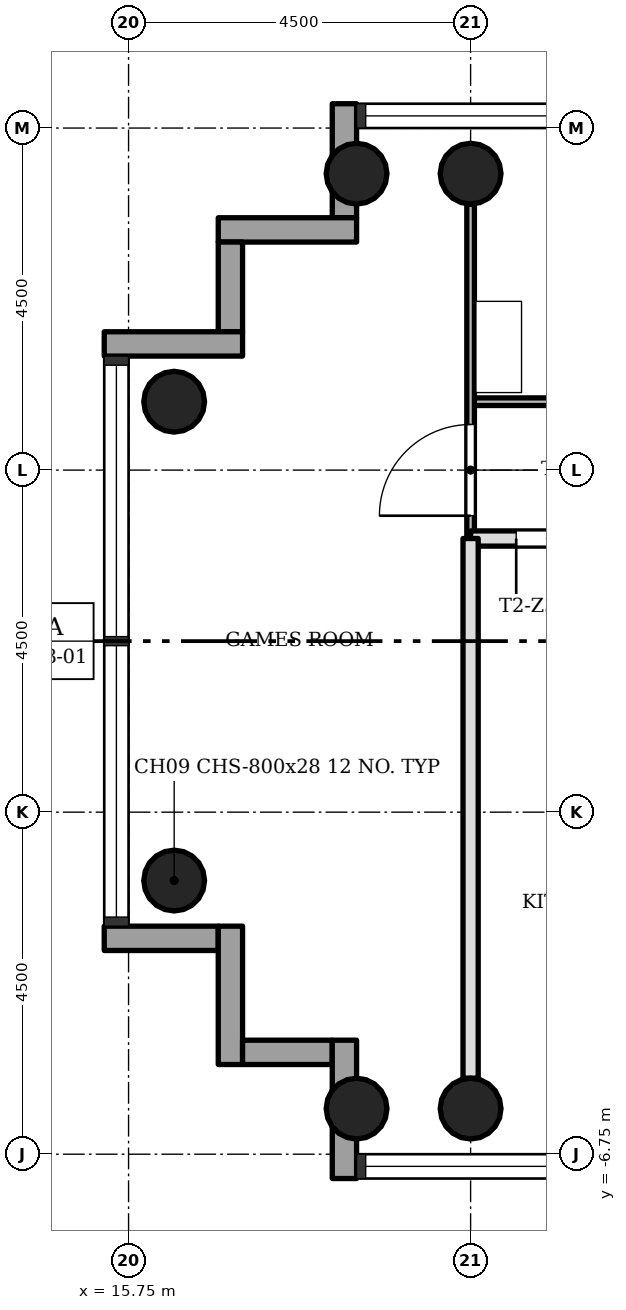
"""IFC4 building model, lengths in metres.
Left out: names, types, materials, properties, quantities, classifications, styles, units other than length and angle.
Written with IfcOpenShell. Run it as: python <this file> out.ifc"""

import sys

from ifc_helpers import new_model, si_unit, direction, frame, frame_2d, origin, origin_2d, place, context, subcontext, project, spatial, rectangle, hollow_circle, extrude, element, fill, save


model = new_model("IFC4")
c1 = context("Model", 3, precision=1e-05, world=origin(), true_north=direction((0.0, 1.0)))
c2 = subcontext(c1, "Body", "Model", "MODEL_VIEW")
j1 = project(units=[si_unit("LENGTHUNIT", "METRE"), si_unit("PLANEANGLEUNIT", "RADIAN")], contexts=[c1])
p1 = place(None, origin())
s1 = spatial("IfcSite", under=j1, at=p1, CompositionType="ELEMENT")
p2 = place(p1, origin())
s2 = spatial("IfcBuilding", under=s1, at=p2, CompositionType="ELEMENT")
p3 = place(p2, frame((0.0, 0.0, 133.7)))
s3 = spatial("IfcBuildingStorey", under=s2, at=p3, CompositionType="ELEMENT", Elevation=133.7)
for number, where, z_axis, x_axis in (
    (1, (20.25, 6.15, 0.0), (0.0, 0.0, 1.0), (1.0, 0.0, 0.0)),
    (2, (20.25, -6.15, 0.0), (0.0, 0.0, 1.0), (1.0, 0.0, 0.0)),
    (3, (18.75, 6.15, 0.0), (0.0, 0.0, 1.0), (1.0, 0.0, 0.0)),
    (4, (18.75, -6.15, 0.0), (0.0, 0.0, 1.0), (1.0, 0.0, 0.0)),
    (5, (16.35, 3.15, 0.0), (0.0, 0.0, 1.0), (1.0, 0.0, 0.0)),
    (6, (16.35, -3.15, 0.0), (0.0, 0.0, 1.0), (1.0, 0.0, 0.0)),
):
    element("IfcColumn", number, at=place(p3, frame(where, z_axis=z_axis, x_axis=x_axis)), inside=s3, PredefinedType="COLUMN", context=c2, shape_type="SweptSolid", body=[
        extrude(hollow_circle(Radius=0.4, WallThickness=0.028, at=origin_2d()), origin(), (0.0, 0.0, 1.0), 3.4),
    ])
p4 = place(p3, frame((18.59, 7.07, -0.3), z_axis=(0.0, 0.0, 1.0), x_axis=(0.0, -1.0, 0.0)))
e7 = element("IfcWall", 7, at=p4, inside=s3, PredefinedType="STANDARD", context=c2, shape_type="SweptSolid", body=[
    extrude(rectangle(XDim=1.5, YDim=0.32, at=frame_2d((0.75, 0.0))), origin(), (0.0, 0.0, 1.0), 3.4),
])
p5 = place(p3, frame((18.75, 5.41, -0.3), z_axis=(0.0, 0.0, 1.0), x_axis=(-1.0, 0.0, 0.0)))
e8 = element("IfcWall", 8, at=p5, inside=s3, PredefinedType="STANDARD", context=c2, shape_type="SweptSolid", body=[
    extrude(rectangle(XDim=1.82, YDim=0.32, at=frame_2d((0.91, 0.0))), origin(), (0.0, 0.0, 1.0), 3.4),
])
p6 = place(p3, frame((17.09, 5.25, -0.3), z_axis=(0.0, 0.0, 1.0), x_axis=(0.0, -1.0, 0.0)))
e9 = element("IfcWall", 9, at=p6, inside=s3, PredefinedType="STANDARD", context=c2, shape_type="SweptSolid", body=[
    extrude(rectangle(XDim=1.18, YDim=0.32, at=frame_2d((0.59, 0.0))), origin(), (0.0, 0.0, 1.0), 3.4),
])
p7 = place(p3, frame((17.25, 3.91, -0.3), z_axis=(0.0, 0.0, 1.0), x_axis=(-1.0, 0.0, 0.0)))
e10 = element("IfcWall", 10, at=p7, inside=s3, PredefinedType="STANDARD", context=c2, shape_type="SweptSolid", body=[
    extrude(rectangle(XDim=1.82, YDim=0.32, at=frame_2d((0.91, 0.0))), origin(), (0.0, 0.0, 1.0), 3.4),
])
p8 = place(p3, frame((15.43, -3.91, -0.3), z_axis=(0.0, 0.0, 1.0), x_axis=(1.0, 0.0, 0.0)))
e11 = element("IfcWall", 11, at=p8, inside=s3, PredefinedType="STANDARD", context=c2, shape_type="SweptSolid", body=[
    extrude(rectangle(XDim=1.5, YDim=0.32, at=frame_2d((0.75, 0.0))), origin(), (0.0, 0.0, 1.0), 3.4),
])
p9 = place(p3, frame((17.09, -3.75, -0.3), z_axis=(0.0, 0.0, 1.0), x_axis=(0.0, -1.0, 0.0)))
e12 = element("IfcWall", 12, at=p9, inside=s3, PredefinedType="STANDARD", context=c2, shape_type="SweptSolid", body=[
    extrude(rectangle(XDim=1.82, YDim=0.32, at=frame_2d((0.91, 0.0))), origin(), (0.0, 0.0, 1.0), 3.4),
])
p10 = place(p3, frame((17.25, -5.41, -0.3), z_axis=(0.0, 0.0, 1.0), x_axis=(1.0, 0.0, 0.0)))
e13 = element("IfcWall", 13, at=p10, inside=s3, PredefinedType="STANDARD", context=c2, shape_type="SweptSolid", body=[
    extrude(rectangle(XDim=1.18, YDim=0.32, at=frame_2d((0.59, 0.0))), origin(), (0.0, 0.0, 1.0), 3.4),
])
p11 = place(p3, frame((18.59, -5.25, -0.3), z_axis=(0.0, 0.0, 1.0), x_axis=(0.0, -1.0, 0.0)))
e14 = element("IfcWall", 14, at=p11, inside=s3, PredefinedType="STANDARD", context=c2, shape_type="SweptSolid", body=[
    extrude(rectangle(XDim=1.82, YDim=0.32, at=frame_2d((0.91, 0.0))), origin(), (0.0, 0.0, 1.0), 3.4),
])
p12 = place(p3, frame((24.75, 1.35, 0.0), z_axis=(0.0, 0.0, 1.0), x_axis=(-1.0, 0.0, 0.0)))
e15 = element("IfcWall", 15, at=p12, inside=s3, PredefinedType="SOLIDWALL", context=c2, shape_type="SweptSolid", body=[
    extrude(rectangle(XDim=4.5, YDim=0.2, at=frame_2d((2.25, 0.0))), origin(), (0.0, 0.0, 1.0), 3.0),
])
p13 = place(p12, frame((3.0, 0.0, 0.0)))
e16 = element("IfcOpeningElement", 16, at=p13, cuts=e15, PredefinedType="OPENING", context=c2, shape_type="SweptSolid", body=[
    extrude(rectangle(XDim=0.9, YDim=2.1, at=frame_2d((0.45, 1.05))), frame((0.0, 0.11, 0.0), z_axis=(0.0, -1.0, 0.0), x_axis=(1.0, 0.0, 0.0)), (0.0, 0.0, 1.0), 0.22),
])
p14 = place(p3, frame((29.25, 3.15, 0.0), z_axis=(0.0, 0.0, 1.0), x_axis=(-1.0, 0.0, 0.0)))
e17 = element("IfcWall", 17, at=p14, inside=s3, PredefinedType="PARTITIONING", context=c2, shape_type="SweptSolid", body=[
    extrude(rectangle(XDim=9.0, YDim=0.1, at=frame_2d((4.5, 0.0))), origin(), (0.0, 0.0, 1.0), 3.0),
])
p15 = place(p14, frame((2.55, 0.0, 0.0)))
e18 = element("IfcOpeningElement", 18, at=p15, cuts=e17, PredefinedType="OPENING", context=c2, shape_type="SweptSolid", body=[
    extrude(rectangle(XDim=0.9, YDim=2.1, at=frame_2d((0.45, 1.05))), frame((0.0, 0.06, 0.0), z_axis=(0.0, -1.0, 0.0), x_axis=(1.0, 0.0, 0.0)), (0.0, 0.0, 1.0), 0.12),
])
p16 = place(p3, frame((20.25, 1.35, 0.0), z_axis=(0.0, 0.0, 1.0), x_axis=(0.0, 1.0, 0.0)))
e19 = element("IfcWall", 19, at=p16, inside=s3, PredefinedType="PARTITIONING", context=c2, shape_type="SweptSolid", body=[
    extrude(rectangle(XDim=4.4, YDim=0.1, at=frame_2d((2.2, 0.0))), origin(), (0.0, 0.0, 1.0), 3.0),
])
p17 = place(p16, frame((0.3, 0.0, 0.0)))
e20 = element("IfcOpeningElement", 20, at=p17, cuts=e19, PredefinedType="OPENING", context=c2, shape_type="SweptSolid", body=[
    extrude(rectangle(XDim=1.2, YDim=2.1, at=frame_2d((0.6, 1.05))), frame((0.0, 0.06, 0.0), z_axis=(0.0, -1.0, 0.0), x_axis=(1.0, 0.0, 0.0)), (0.0, 0.0, 1.0), 0.12),
])
p18 = place(p3, frame((20.25, -5.75, 0.0), z_axis=(0.0, 0.0, 1.0), x_axis=(0.0, 1.0, 0.0)))
e21 = element("IfcWall", 21, at=p18, inside=s3, PredefinedType="SOLIDWALL", context=c2, shape_type="SweptSolid", body=[
    extrude(rectangle(XDim=7.1, YDim=0.2, at=frame_2d((3.55, 0.0))), origin(), (0.0, 0.0, 1.0), 3.0),
])
p19 = place(p13, origin())
e22 = element("IfcDoor", 22, at=p19, inside=s3, OperationType="SINGLE_SWING_LEFT", PredefinedType="DOOR", context=c2, shape_type="SweptSolid", body=[
    extrude(rectangle(XDim=0.9, YDim=2.1, at=frame_2d((0.45, 1.05))), frame((0.0, 0.025, 0.0), z_axis=(0.0, -1.0, 0.0), x_axis=(1.0, 0.0, 0.0)), (0.0, 0.0, 1.0), 0.05),
])
fill(e16, e22)
p20 = place(p17, origin())
e23 = element("IfcDoor", 23, at=p20, inside=s3, OperationType="SINGLE_SWING_RIGHT", PredefinedType="DOOR", context=c2, shape_type="SweptSolid", body=[
    extrude(rectangle(XDim=1.2, YDim=2.1, at=frame_2d((0.6, 1.05))), frame((0.0, 0.025, 0.0), z_axis=(0.0, -1.0, 0.0), x_axis=(1.0, 0.0, 0.0)), (0.0, 0.0, 1.0), 0.05),
])
fill(e20, e23)
save(model, sys.argv[1])
